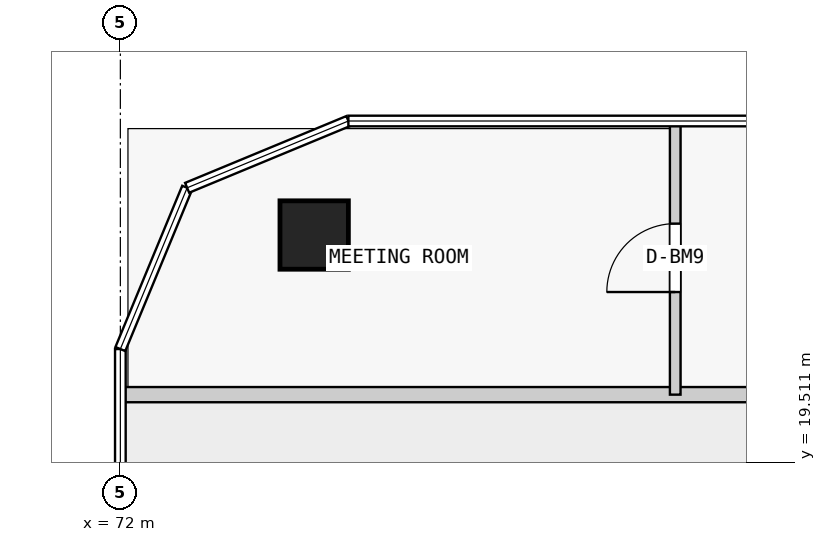
"""IFC4 building model, lengths in metres.
Left out: names, types, materials, properties, quantities, classifications, styles, units other than length and angle.
Written with IfcOpenShell. Run it as: python <this file> out.ifc"""

import sys

from ifc_helpers import new_model, si_unit, direction, frame, frame_2d, origin, origin_2d, place, context, subcontext, project, spatial, rectangle, extrude, element, fill, save


model = new_model("IFC4")
c1 = context("Model", 3, precision=1e-05, world=origin(), true_north=direction((0.0, 1.0)))
c2 = subcontext(c1, "Body", "Model", "MODEL_VIEW")
j1 = project(units=[si_unit("LENGTHUNIT", "METRE"), si_unit("PLANEANGLEUNIT", "RADIAN")], contexts=[c1])
p1 = place(None, origin())
s1 = spatial("IfcSite", under=j1, at=p1, CompositionType="ELEMENT")
p2 = place(p1, origin())
s2 = spatial("IfcBuilding", under=s1, at=p2, CompositionType="ELEMENT")
p3 = place(p2, frame((0.0, 0.0, 68.8)))
s3 = spatial("IfcBuildingStorey", under=s2, at=p3, CompositionType="ELEMENT", Elevation=68.8)
p4 = place(p3, frame((74.55, 22.5, 0.0), z_axis=(0.0, 0.0, 1.0), x_axis=(1.0, 0.0, 0.0)))
e1 = element("IfcColumn", 1, at=p4, inside=s3, PredefinedType="COLUMN", context=c2, shape_type="SweptSolid", body=[
    extrude(rectangle(XDim=0.9, YDim=0.9, at=origin_2d()), origin(), (0.0, 0.0, 1.0), 3.5),
])
p5 = place(p3, frame((72.0, 20.4, 0.0), z_axis=(0.0, 0.0, 1.0), x_axis=(1.0, 0.0, 0.0)))
e2 = element("IfcWall", 2, at=p5, inside=s3, PredefinedType="PARTITIONING", context=c2, shape_type="SweptSolid", body=[
    extrude(rectangle(XDim=20.0, YDim=0.2, at=frame_2d((10.0, 0.0))), origin(), (0.0, 0.0, 1.0), 3.2),
])
p6 = place(p3, frame((79.3, 20.4, 0.0), z_axis=(0.0, 0.0, 1.0), x_axis=(0.0, 1.0, 0.0)))
e3 = element("IfcWall", 3, at=p6, inside=s3, PredefinedType="PARTITIONING", context=c2, shape_type="SweptSolid", body=[
    extrude(rectangle(XDim=3.6, YDim=0.14, at=frame_2d((1.8, 0.0))), origin(), (0.0, 0.0, 1.0), 3.2),
])
p7 = place(p6, frame((1.35, 0.0, 0.0)))
e4 = element("IfcOpeningElement", 4, at=p7, cuts=e3, PredefinedType="OPENING", context=c2, shape_type="SweptSolid", body=[
    extrude(rectangle(XDim=0.9, YDim=2.4, at=frame_2d((0.45, 1.2))), frame((0.0, 0.08, 0.0), z_axis=(0.0, -1.0, 0.0), x_axis=(1.0, 0.0, 0.0)), (0.0, 0.0, 1.0), 0.16),
])
p8 = place(p7, origin())
e5 = element("IfcDoor", 5, at=p8, inside=s3, OperationType="SINGLE_SWING_LEFT", PredefinedType="DOOR", context=c2, shape_type="SweptSolid", body=[
    extrude(rectangle(XDim=0.9, YDim=2.4, at=frame_2d((0.45, 1.2))), frame((0.0, 0.025, 0.0), z_axis=(0.0, -1.0, 0.0), x_axis=(1.0, 0.0, 0.0)), (0.0, 0.0, 1.0), 0.05),
])
fill(e4, e5)
save(model, sys.argv[1])
